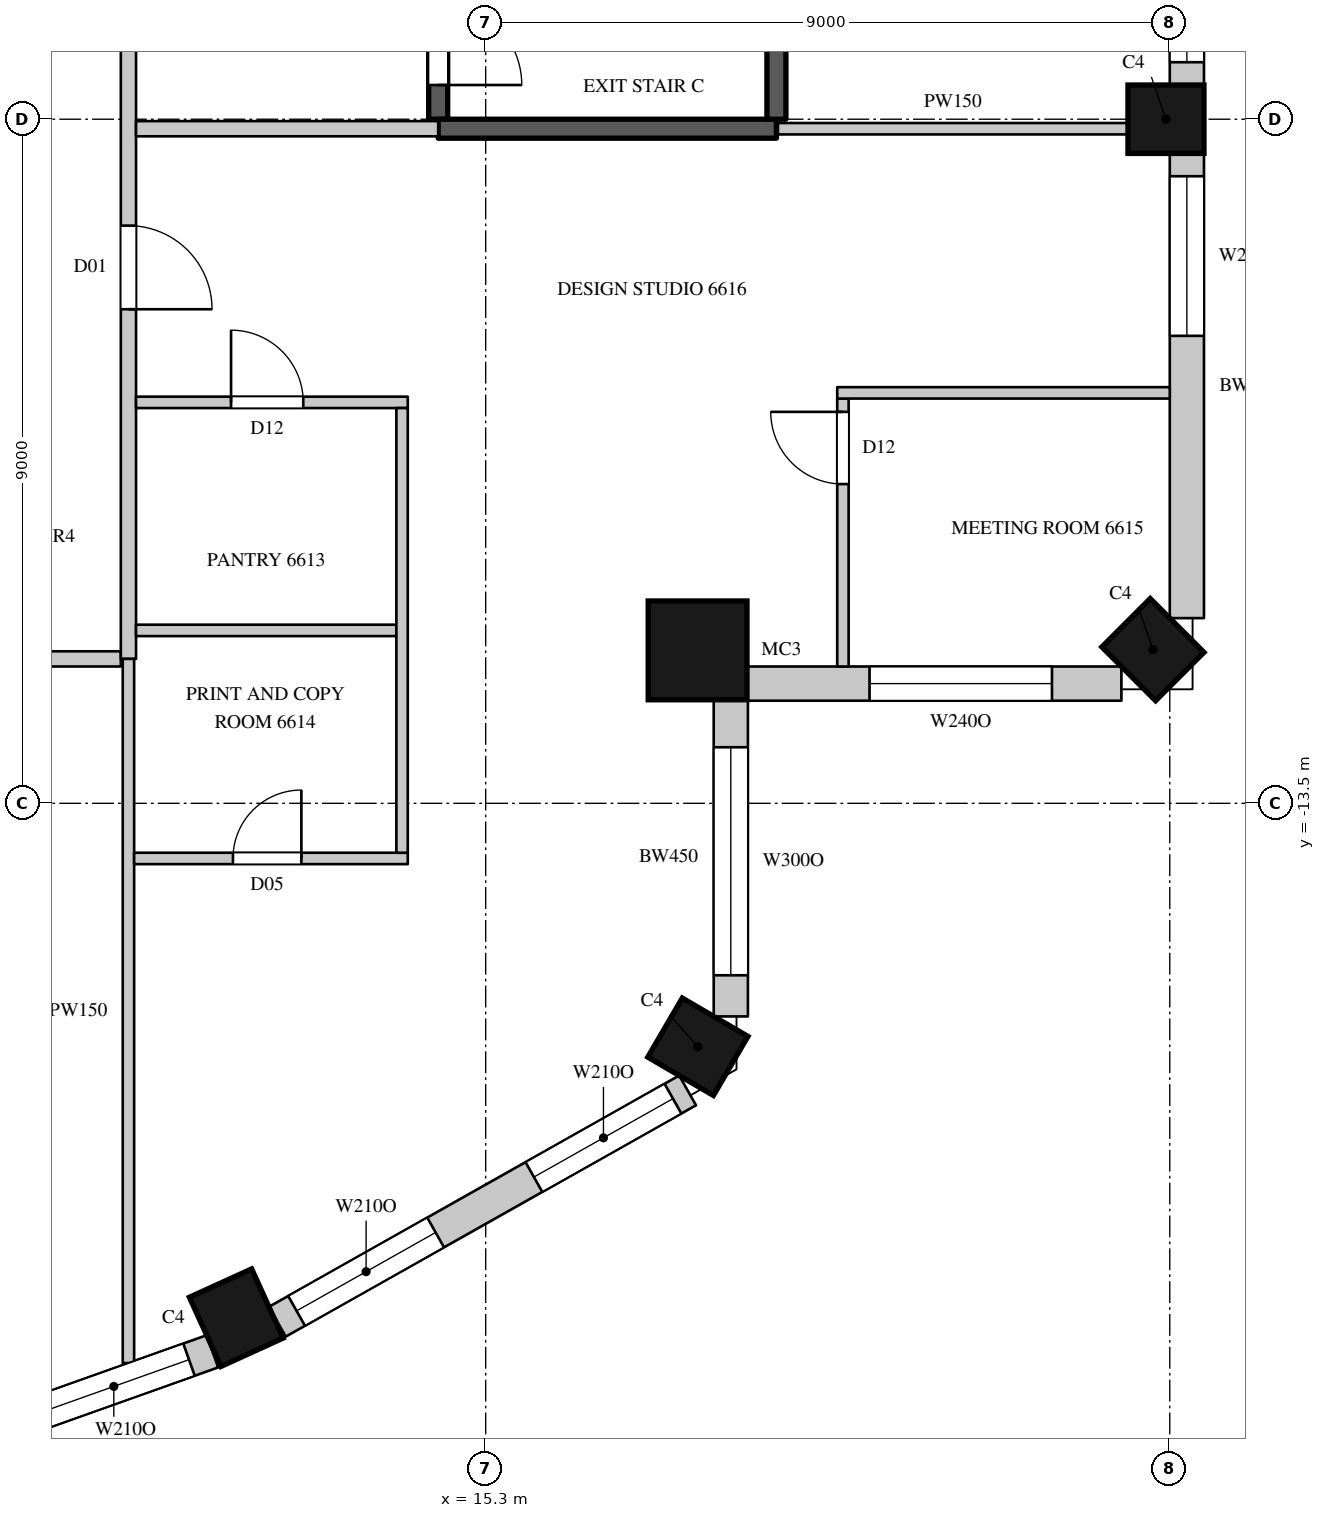
"""IFC4 building model, lengths in metres.
Left out: names, types, materials, properties, quantities, classifications, styles, units other than length and angle.
Written with IfcOpenShell. Run it as: python <this file> out.ifc"""

import sys

from ifc_helpers import new_model, si_unit, direction, frame, frame_2d, origin, origin_2d, place, context, subcontext, project, spatial, rectangle, circle, extrude, element, fill, save


model = new_model("IFC4")
c1 = context("Model", 3, precision=1e-05, world=origin(), true_north=direction((0.0, 1.0)))
c2 = subcontext(c1, "Body", "Model", "MODEL_VIEW")
j1 = project(units=[si_unit("LENGTHUNIT", "METRE"), si_unit("PLANEANGLEUNIT", "RADIAN")], contexts=[c1])
p1 = place(None, origin())
s1 = spatial("IfcSite", under=j1, at=p1, CompositionType="ELEMENT")
p2 = place(p1, origin())
s2 = spatial("IfcBuilding", under=s1, at=p2, CompositionType="ELEMENT")
p3 = place(p2, frame((0.0, 0.0, 292.6)))
s3 = spatial("IfcBuildingStorey", under=s2, at=p3, CompositionType="ELEMENT", Elevation=292.6)
for number, where, z_axis, x_axis in (
    (1, (12.019, -20.267, 0.0), (0.0, 0.0, 1.0), (0.91, 0.415, 0.0)),
    (2, (18.091, -16.703, 0.0), (0.0, 0.0, 1.0), (0.504, 0.863, 0.0)),
):
    element("IfcColumn", number, at=place(p3, frame(where, z_axis=z_axis, x_axis=x_axis)), inside=s3, PredefinedType="COLUMN", context=c2, shape_type="SweptSolid", body=[
        extrude(rectangle(XDim=0.9, YDim=1.0, at=origin_2d()), origin(), (0.0, 0.0, 1.0), 4.1),
    ])
p4 = place(p3, frame((18.088, -11.488, 0.0), z_axis=(0.0, 0.0, 1.0), x_axis=(1.0, 0.0, 0.0)))
e3 = element("IfcColumn", 3, at=p4, inside=s3, PredefinedType="COLUMN", context=c2, shape_type="SweptSolid", body=[
    extrude(circle(Radius=0.65, at=origin_2d()), origin(), (0.0, 0.0, 1.0), 4.1),
])
for number, where, z_axis, x_axis in (
    (4, (24.078, -11.478, 0.0), (0.0, 0.0, 1.0), (0.707, 0.707, 0.0)),
    (5, (24.25, -4.5, 0.0), (0.0, 0.0, 1.0), (0.0, 1.0, 0.0)),
):
    element("IfcColumn", number, at=place(p3, frame(where, z_axis=z_axis, x_axis=x_axis)), inside=s3, PredefinedType="COLUMN", context=c2, shape_type="SweptSolid", body=[
        extrude(rectangle(XDim=0.9, YDim=1.0, at=origin_2d()), origin(), (0.0, 0.0, 1.0), 4.1),
    ])
p5 = place(p3, frame((5.665, -22.859, 0.0), z_axis=(0.0, 0.0, 1.0), x_axis=(0.942108340262, 0.335308626803, 0.0)))
e6 = element("IfcWall", 6, at=p5, inside=s3, PredefinedType="SOLIDWALL", context=c2, shape_type="SweptSolid", body=[
    extrude(rectangle(XDim=6.412, YDim=0.45, at=frame_2d((3.206, 0.0))), origin(), (0.0, 0.0, 1.0), 3.8),
])
p6 = place(p5, frame((0.327, 0.0, 1.05)))
e7 = element("IfcOpeningElement", 7, at=p6, cuts=e6, PredefinedType="OPENING", context=c2, shape_type="SweptSolid", body=[
    extrude(rectangle(XDim=2.1, YDim=2.4, at=frame_2d((1.05, 1.2))), frame((0.0, 0.235, 0.0), z_axis=(0.0, -1.0, 0.0), x_axis=(1.0, 0.0, 0.0)), (0.0, 0.0, 1.0), 0.47),
])
p7 = place(p5, frame((3.985, 0.0, 1.05)))
e8 = element("IfcOpeningElement", 8, at=p7, cuts=e6, PredefinedType="OPENING", context=c2, shape_type="SweptSolid", body=[
    extrude(rectangle(XDim=2.1, YDim=2.4, at=frame_2d((1.05, 1.2))), frame((0.0, 0.235, 0.0), z_axis=(0.0, -1.0, 0.0), x_axis=(1.0, 0.0, 0.0)), (0.0, 0.0, 1.0), 0.47),
])
p8 = place(p3, frame((12.559, -20.32, 0.0), z_axis=(0.0, 0.0, 1.0), x_axis=(0.871065783524, 0.491166367714, 0.0)))
e9 = element("IfcWall", 9, at=p8, inside=s3, PredefinedType="SOLIDWALL", context=c2, shape_type="SweptSolid", body=[
    extrude(rectangle(XDim=6.196, YDim=0.45, at=frame_2d((3.098, 0.0))), origin(), (0.0, 0.0, 1.0), 3.8),
])
p9 = place(p8, frame((0.291, 0.0, 1.05)))
e10 = element("IfcOpeningElement", 10, at=p9, cuts=e9, PredefinedType="OPENING", context=c2, shape_type="SweptSolid", body=[
    extrude(rectangle(XDim=2.1, YDim=2.4, at=frame_2d((1.05, 1.2))), frame((0.0, 0.235, 0.0), z_axis=(0.0, -1.0, 0.0), x_axis=(1.0, 0.0, 0.0)), (0.0, 0.0, 1.0), 0.47),
])
p10 = place(p8, frame((3.875, 0.0, 1.05)))
e11 = element("IfcOpeningElement", 11, at=p10, cuts=e9, PredefinedType="OPENING", context=c2, shape_type="SweptSolid", body=[
    extrude(rectangle(XDim=2.1, YDim=2.4, at=frame_2d((1.05, 1.2))), frame((0.0, 0.235, 0.0), z_axis=(0.0, -1.0, 0.0), x_axis=(1.0, 0.0, 0.0)), (0.0, 0.0, 1.0), 0.47),
])
p11 = place(p3, frame((18.525, -16.304, 0.0), z_axis=(0.0, 0.0, 1.0), x_axis=(0.0, 1.0, 0.0)))
e12 = element("IfcWall", 12, at=p11, inside=s3, PredefinedType="SOLIDWALL", context=c2, shape_type="SweptSolid", body=[
    extrude(rectangle(XDim=4.202, YDim=0.45, at=frame_2d((2.101, 0.0))), origin(), (0.0, 0.0, 1.0), 3.8),
])
p12 = place(p11, frame((0.541, 0.0, 1.05)))
e13 = element("IfcOpeningElement", 13, at=p12, cuts=e12, PredefinedType="OPENING", context=c2, shape_type="SweptSolid", body=[
    extrude(rectangle(XDim=3.0, YDim=2.4, at=frame_2d((1.5, 1.2))), frame((0.0, 0.235, 0.0), z_axis=(0.0, -1.0, 0.0), x_axis=(1.0, 0.0, 0.0)), (0.0, 0.0, 1.0), 0.47),
])
p13 = place(p3, frame((18.701, -11.925, 0.0), z_axis=(0.0, 0.0, 1.0), x_axis=(1.0, 0.0, 0.0)))
e14 = element("IfcWall", 14, at=p13, inside=s3, PredefinedType="SOLIDWALL", context=c2, shape_type="SweptSolid", body=[
    extrude(rectangle(XDim=4.962, YDim=0.45, at=frame_2d((2.481, 0.0))), origin(), (0.0, 0.0, 1.0), 3.8),
])
p14 = place(p13, frame((1.648, 0.0, 1.05)))
e15 = element("IfcOpeningElement", 15, at=p14, cuts=e14, PredefinedType="OPENING", context=c2, shape_type="SweptSolid", body=[
    extrude(rectangle(XDim=2.4, YDim=2.4, at=frame_2d((1.2, 1.2))), frame((0.0, 0.235, 0.0), z_axis=(0.0, -1.0, 0.0), x_axis=(1.0, 0.0, 0.0)), (0.0, 0.0, 1.0), 0.47),
])
p15 = place(p3, frame((24.525, -11.064, 0.0), z_axis=(0.0, 0.0, 1.0), x_axis=(0.0, 1.0, 0.0)))
e16 = element("IfcWall", 16, at=p15, inside=s3, PredefinedType="SOLIDWALL", context=c2, shape_type="SweptSolid", body=[
    extrude(rectangle(XDim=6.114, YDim=0.45, at=frame_2d((3.057, 0.0))), origin(), (0.0, 0.0, 1.0), 3.8),
])
p16 = place(p15, frame((3.714, 0.0, 1.05)))
e17 = element("IfcOpeningElement", 17, at=p16, cuts=e16, PredefinedType="OPENING", context=c2, shape_type="SweptSolid", body=[
    extrude(rectangle(XDim=2.1, YDim=2.4, at=frame_2d((1.05, 1.2))), frame((0.0, 0.235, 0.0), z_axis=(0.0, -1.0, 0.0), x_axis=(1.0, 0.0, 0.0)), (0.0, 0.0, 1.0), 0.47),
])
p17 = place(p3, frame((24.525, -4.05, 0.0), z_axis=(0.0, 0.0, 1.0), x_axis=(0.0, 1.0, 0.0)))
e18 = element("IfcWall", 18, at=p17, inside=s3, PredefinedType="SOLIDWALL", context=c2, shape_type="SweptSolid", body=[
    extrude(rectangle(XDim=8.1, YDim=0.45, at=frame_2d((4.05, 0.0))), origin(), (0.0, 0.0, 1.0), 3.8),
])
p18 = place(p17, frame((0.3, 0.0, 1.05)))
e19 = element("IfcOpeningElement", 19, at=p18, cuts=e18, PredefinedType="OPENING", context=c2, shape_type="SweptSolid", body=[
    extrude(rectangle(XDim=3.0, YDim=2.4, at=frame_2d((1.5, 1.2))), frame((0.0, 0.235, 0.0), z_axis=(0.0, -1.0, 0.0), x_axis=(1.0, 0.0, 0.0)), (0.0, 0.0, 1.0), 0.47),
])
p19 = place(p17, frame((4.8, 0.0, 1.05)))
e20 = element("IfcOpeningElement", 20, at=p19, cuts=e18, PredefinedType="OPENING", context=c2, shape_type="SweptSolid", body=[
    extrude(rectangle(XDim=3.0, YDim=2.4, at=frame_2d((1.5, 1.2))), frame((0.0, 0.235, 0.0), z_axis=(0.0, -1.0, 0.0), x_axis=(1.0, 0.0, 0.0)), (0.0, 0.0, 1.0), 0.47),
])
p20 = place(p3, frame((7.021, -11.6, 0.0), z_axis=(0.0, 0.0, 1.0), x_axis=(1.0, 0.0, 0.0)))
e21 = element("IfcWall", 21, at=p20, inside=s3, PredefinedType="PARTITIONING", context=c2, shape_type="SweptSolid", body=[
    extrude(rectangle(XDim=3.479, YDim=0.2, at=frame_2d((1.74, 0.0))), origin(), (0.0, 0.0, 1.0), 3.8),
])
p21 = place(p3, frame((10.6, -11.6, 0.0), z_axis=(0.0, 0.0, 1.0), x_axis=(0.0, 1.0, 0.0)))
e22 = element("IfcWall", 22, at=p21, inside=s3, PredefinedType="PARTITIONING", context=c2, shape_type="SweptSolid", body=[
    extrude(rectangle(XDim=23.7, YDim=0.2, at=frame_2d((11.85, 0.0))), origin(), (0.0, 0.0, 1.0), 3.8),
])
p22 = place(p21, frame((9.45, 0.0, 0.0)))
e23 = element("IfcOpeningElement", 23, at=p22, cuts=e22, PredefinedType="OPENING", context=c2, shape_type="SweptSolid", body=[
    extrude(rectangle(XDim=1.5, YDim=2.4, at=frame_2d((0.75, 1.2))), frame((0.0, 0.11, 0.0), z_axis=(0.0, -1.0, 0.0), x_axis=(1.0, 0.0, 0.0)), (0.0, 0.0, 1.0), 0.22),
])
p23 = place(p21, frame((19.45, 0.0, 0.0)))
e24 = element("IfcOpeningElement", 24, at=p23, cuts=e22, PredefinedType="OPENING", context=c2, shape_type="SweptSolid", body=[
    extrude(rectangle(XDim=1.1, YDim=2.4, at=frame_2d((0.55, 1.2))), frame((0.0, 0.11, 0.0), z_axis=(0.0, -1.0, 0.0), x_axis=(1.0, 0.0, 0.0)), (0.0, 0.0, 1.0), 0.22),
])
p24 = place(p21, frame((4.6, 0.0, 0.0)))
e25 = element("IfcOpeningElement", 25, at=p24, cuts=e22, PredefinedType="OPENING", context=c2, shape_type="SweptSolid", body=[
    extrude(rectangle(XDim=1.1, YDim=2.4, at=frame_2d((0.55, 1.2))), frame((0.0, 0.11, 0.0), z_axis=(0.0, -1.0, 0.0), x_axis=(1.0, 0.0, 0.0)), (0.0, 0.0, 1.0), 0.22),
])
p25 = place(p3, frame((10.7, -4.625, 0.0), z_axis=(0.0, 0.0, 1.0), x_axis=(1.0, 0.0, 0.0)))
e26 = element("IfcWall", 26, at=p25, inside=s3, PredefinedType="PARTITIONING", context=c2, shape_type="SweptSolid", body=[
    extrude(rectangle(XDim=3.975, YDim=0.2, at=frame_2d((1.988, 0.0))), origin(), (0.0, 0.0, 1.0), 3.8),
])
p26 = place(p3, frame((10.6, -20.864, 0.0), z_axis=(0.0, 0.0, 1.0), x_axis=(0.0, 1.0, 0.0)))
e27 = element("IfcWall", 27, at=p26, inside=s3, PredefinedType="PARTITIONING", context=c2, shape_type="SweptSolid", body=[
    extrude(rectangle(XDim=9.264, YDim=0.15, at=frame_2d((4.632, 0.0))), origin(), (0.0, 0.0, 1.0), 3.8),
])
p27 = place(p3, frame((10.675, -14.225, 0.0), z_axis=(0.0, 0.0, 1.0), x_axis=(1.0, 0.0, 0.0)))
e28 = element("IfcWall", 28, at=p27, inside=s3, PredefinedType="PARTITIONING", context=c2, shape_type="SweptSolid", body=[
    extrude(rectangle(XDim=3.6, YDim=0.15, at=frame_2d((1.8, 0.0))), origin(), (0.0, 0.0, 1.0), 3.8),
])
p28 = place(p27, frame((1.3, 0.0, 0.0)))
e29 = element("IfcOpeningElement", 29, at=p28, cuts=e28, PredefinedType="OPENING", context=c2, shape_type="SweptSolid", body=[
    extrude(rectangle(XDim=0.9, YDim=2.2, at=frame_2d((0.45, 1.1))), frame((0.0, 0.085, 0.0), z_axis=(0.0, -1.0, 0.0), x_axis=(1.0, 0.0, 0.0)), (0.0, 0.0, 1.0), 0.17),
])
p29 = place(p3, frame((10.7, -11.225, 0.0), z_axis=(0.0, 0.0, 1.0), x_axis=(1.0, 0.0, 0.0)))
e30 = element("IfcWall", 30, at=p29, inside=s3, PredefinedType="PARTITIONING", context=c2, shape_type="SweptSolid", body=[
    extrude(rectangle(XDim=3.425, YDim=0.15, at=frame_2d((1.712, 0.0))), origin(), (0.0, 0.0, 1.0), 3.8),
])
p30 = place(p3, frame((10.7, -8.225, 0.0), z_axis=(0.0, 0.0, 1.0), x_axis=(1.0, 0.0, 0.0)))
e31 = element("IfcWall", 31, at=p30, inside=s3, PredefinedType="PARTITIONING", context=c2, shape_type="SweptSolid", body=[
    extrude(rectangle(XDim=3.575, YDim=0.15, at=frame_2d((1.788, 0.0))), origin(), (0.0, 0.0, 1.0), 3.15),
])
p31 = place(p30, frame((1.25, 0.0, 0.0)))
e32 = element("IfcOpeningElement", 32, at=p31, cuts=e31, PredefinedType="OPENING", context=c2, shape_type="SweptSolid", body=[
    extrude(rectangle(XDim=0.95, YDim=2.2, at=frame_2d((0.475, 1.1))), frame((0.0, 0.085, 0.0), z_axis=(0.0, -1.0, 0.0), x_axis=(1.0, 0.0, 0.0)), (0.0, 0.0, 1.0), 0.17),
])
p32 = place(p3, frame((14.2, -14.15, 0.0), z_axis=(0.0, 0.0, 1.0), x_axis=(0.0, 1.0, 0.0)))
e33 = element("IfcWall", 33, at=p32, inside=s3, PredefinedType="PARTITIONING", context=c2, shape_type="SweptSolid", body=[
    extrude(rectangle(XDim=5.85, YDim=0.15, at=frame_2d((2.925, 0.0))), origin(), (0.0, 0.0, 1.0), 3.8),
])
p33 = place(p3, frame((19.145, -4.625, 0.0), z_axis=(0.0, 0.0, 1.0), x_axis=(1.0, 0.0, 0.0)))
e34 = element("IfcWall", 34, at=p33, inside=s3, PredefinedType="PARTITIONING", context=c2, shape_type="SweptSolid", body=[
    extrude(rectangle(XDim=4.605, YDim=0.15, at=frame_2d((2.302, 0.0))), origin(), (0.0, 0.0, 1.0), 3.8),
])
p34 = place(p3, frame((20.0, -11.7, 0.0), z_axis=(0.0, 0.0, 1.0), x_axis=(0.0, 1.0, 0.0)))
e35 = element("IfcWall", 35, at=p34, inside=s3, PredefinedType="PARTITIONING", context=c2, shape_type="SweptSolid", body=[
    extrude(rectangle(XDim=3.525, YDim=0.15, at=frame_2d((1.762, 0.0))), origin(), (0.0, 0.0, 1.0), 3.8),
])
p35 = place(p34, frame((2.4, 0.0, 0.0)))
e36 = element("IfcOpeningElement", 36, at=p35, cuts=e35, PredefinedType="OPENING", context=c2, shape_type="SweptSolid", body=[
    extrude(rectangle(XDim=0.95, YDim=2.2, at=frame_2d((0.475, 1.1))), frame((0.0, 0.085, 0.0), z_axis=(0.0, -1.0, 0.0), x_axis=(1.0, 0.0, 0.0)), (0.0, 0.0, 1.0), 0.17),
])
p36 = place(p3, frame((19.925, -8.1, 0.0), z_axis=(0.0, 0.0, 1.0), x_axis=(1.0, 0.0, 0.0)))
e37 = element("IfcWall", 37, at=p36, inside=s3, PredefinedType="PARTITIONING", context=c2, shape_type="SweptSolid", body=[
    extrude(rectangle(XDim=4.375, YDim=0.15, at=frame_2d((2.188, 0.0))), origin(), (0.0, 0.0, 1.0), 3.15),
])
p37 = place(p3, frame((14.675, -4.5, 0.0), z_axis=(0.0, 0.0, 1.0), x_axis=(0.0, 1.0, 0.0)))
e38 = element("IfcWall", 38, at=p37, inside=s3, PredefinedType="SHEAR", context=c2, shape_type="SweptSolid", body=[
    extrude(rectangle(XDim=9.0, YDim=0.25, at=frame_2d((4.5, 0.0))), origin(), (0.0, 0.0, 1.0), 3.8),
])
p38 = place(p37, frame((0.45, 0.0, 0.0)))
e39 = element("IfcOpeningElement", 39, at=p38, cuts=e38, PredefinedType="OPENING", context=c2, shape_type="SweptSolid", body=[
    extrude(rectangle(XDim=1.1, YDim=2.2, at=frame_2d((0.55, 1.1))), frame((0.0, 0.135, 0.0), z_axis=(0.0, -1.0, 0.0), x_axis=(1.0, 0.0, 0.0)), (0.0, 0.0, 1.0), 0.27),
])
p39 = place(p3, frame((14.675, -4.625, 0.0), z_axis=(0.0, 0.0, 1.0), x_axis=(1.0, 0.0, 0.0)))
e40 = element("IfcWall", 40, at=p39, inside=s3, PredefinedType="SHEAR", context=c2, shape_type="SweptSolid", body=[
    extrude(rectangle(XDim=4.45, YDim=0.25, at=frame_2d((2.225, 0.0))), origin(), (0.0, 0.0, 1.0), 3.8),
])
p40 = place(p3, frame((19.125, -4.5, 0.0), z_axis=(0.0, 0.0, 1.0), x_axis=(0.0, 1.0, 0.0)))
e41 = element("IfcWall", 41, at=p40, inside=s3, PredefinedType="SHEAR", context=c2, shape_type="SweptSolid", body=[
    extrude(rectangle(XDim=9.0, YDim=0.25, at=frame_2d((4.5, 0.0))), origin(), (0.0, 0.0, 1.0), 3.8),
])
p41 = place(p7, origin())
e42 = element("IfcWindow", 42, at=p41, inside=s3, PartitioningType="SINGLE_PANEL", PredefinedType="WINDOW", context=c2, shape_type="SweptSolid", body=[
    extrude(rectangle(XDim=2.1, YDim=2.4, at=frame_2d((1.05, 1.2))), frame((0.0, 0.135, 0.0), z_axis=(0.0, -1.0, 0.0), x_axis=(1.0, 0.0, 0.0)), (0.0, 0.0, 1.0), 0.06),
])
fill(e8, e42)
p42 = place(p9, origin())
e43 = element("IfcWindow", 43, at=p42, inside=s3, PartitioningType="SINGLE_PANEL", PredefinedType="WINDOW", context=c2, shape_type="SweptSolid", body=[
    extrude(rectangle(XDim=2.1, YDim=2.4, at=frame_2d((1.05, 1.2))), frame((0.0, 0.135, 0.0), z_axis=(0.0, -1.0, 0.0), x_axis=(1.0, 0.0, 0.0)), (0.0, 0.0, 1.0), 0.06),
])
fill(e10, e43)
p43 = place(p10, origin())
e44 = element("IfcWindow", 44, at=p43, inside=s3, PartitioningType="SINGLE_PANEL", PredefinedType="WINDOW", context=c2, shape_type="SweptSolid", body=[
    extrude(rectangle(XDim=2.1, YDim=2.4, at=frame_2d((1.05, 1.2))), frame((0.0, 0.135, 0.0), z_axis=(0.0, -1.0, 0.0), x_axis=(1.0, 0.0, 0.0)), (0.0, 0.0, 1.0), 0.06),
])
fill(e11, e44)
p44 = place(p12, origin())
e45 = element("IfcWindow", 45, at=p44, inside=s3, PartitioningType="SINGLE_PANEL", PredefinedType="WINDOW", context=c2, shape_type="SweptSolid", body=[
    extrude(rectangle(XDim=3.0, YDim=2.4, at=frame_2d((1.5, 1.2))), frame((0.0, 0.135, 0.0), z_axis=(0.0, -1.0, 0.0), x_axis=(1.0, 0.0, 0.0)), (0.0, 0.0, 1.0), 0.06),
])
fill(e13, e45)
p45 = place(p16, origin())
e46 = element("IfcWindow", 46, at=p45, inside=s3, PartitioningType="SINGLE_PANEL", PredefinedType="WINDOW", context=c2, shape_type="SweptSolid", body=[
    extrude(rectangle(XDim=2.1, YDim=2.4, at=frame_2d((1.05, 1.2))), frame((0.0, 0.135, 0.0), z_axis=(0.0, -1.0, 0.0), x_axis=(1.0, 0.0, 0.0)), (0.0, 0.0, 1.0), 0.06),
])
fill(e17, e46)
p46 = place(p18, origin())
e47 = element("IfcWindow", 47, at=p46, inside=s3, PartitioningType="SINGLE_PANEL", PredefinedType="WINDOW", context=c2, shape_type="SweptSolid", body=[
    extrude(rectangle(XDim=3.0, YDim=2.4, at=frame_2d((1.5, 1.2))), frame((0.0, 0.135, 0.0), z_axis=(0.0, -1.0, 0.0), x_axis=(1.0, 0.0, 0.0)), (0.0, 0.0, 1.0), 0.06),
])
fill(e19, e47)
p47 = place(p24, origin())
e48 = element("IfcDoor", 48, at=p47, inside=s3, OperationType="SINGLE_SWING_RIGHT", PredefinedType="DOOR", context=c2, shape_type="SweptSolid", body=[
    extrude(rectangle(XDim=1.1, YDim=2.4, at=frame_2d((0.55, 1.2))), frame((0.0, 0.025, 0.0), z_axis=(0.0, -1.0, 0.0), x_axis=(1.0, 0.0, 0.0)), (0.0, 0.0, 1.0), 0.05),
])
fill(e25, e48)
p48 = place(p31, origin())
e49 = element("IfcDoor", 49, at=p48, inside=s3, OperationType="SINGLE_SWING_LEFT", PredefinedType="DOOR", context=c2, shape_type="SweptSolid", body=[
    extrude(rectangle(XDim=0.95, YDim=2.2, at=frame_2d((0.475, 1.1))), frame((0.0, 0.025, 0.0), z_axis=(0.0, -1.0, 0.0), x_axis=(1.0, 0.0, 0.0)), (0.0, 0.0, 1.0), 0.05),
])
fill(e32, e49)
p49 = place(p28, origin())
e50 = element("IfcDoor", 50, at=p49, inside=s3, OperationType="SINGLE_SWING_RIGHT", PredefinedType="DOOR", context=c2, shape_type="SweptSolid", body=[
    extrude(rectangle(XDim=0.9, YDim=2.2, at=frame_2d((0.45, 1.1))), frame((0.0, 0.025, 0.0), z_axis=(0.0, -1.0, 0.0), x_axis=(1.0, 0.0, 0.0)), (0.0, 0.0, 1.0), 0.05),
])
fill(e29, e50)
p50 = place(p35, origin())
e51 = element("IfcDoor", 51, at=p50, inside=s3, OperationType="SINGLE_SWING_RIGHT", PredefinedType="DOOR", context=c2, shape_type="SweptSolid", body=[
    extrude(rectangle(XDim=0.95, YDim=2.2, at=frame_2d((0.475, 1.1))), frame((0.0, 0.025, 0.0), z_axis=(0.0, -1.0, 0.0), x_axis=(1.0, 0.0, 0.0)), (0.0, 0.0, 1.0), 0.05),
])
fill(e36, e51)
p51 = place(p38, origin())
e52 = element("IfcDoor", 52, at=p51, inside=s3, OperationType="SINGLE_SWING_RIGHT", PredefinedType="DOOR", context=c2, shape_type="SweptSolid", body=[
    extrude(rectangle(XDim=1.1, YDim=2.2, at=frame_2d((0.55, 1.1))), frame((0.0, 0.025, 0.0), z_axis=(0.0, -1.0, 0.0), x_axis=(1.0, 0.0, 0.0)), (0.0, 0.0, 1.0), 0.05),
])
fill(e39, e52)
p52 = place(p14, origin())
e53 = element("IfcWindow", 53, at=p52, inside=s3, PartitioningType="SINGLE_PANEL", PredefinedType="WINDOW", context=c2, shape_type="SweptSolid", body=[
    extrude(rectangle(XDim=2.4, YDim=2.4, at=frame_2d((1.2, 1.2))), frame((0.0, 0.135, 0.0), z_axis=(0.0, -1.0, 0.0), x_axis=(1.0, 0.0, 0.0)), (0.0, 0.0, 1.0), 0.06),
])
fill(e15, e53)
save(model, sys.argv[1])
